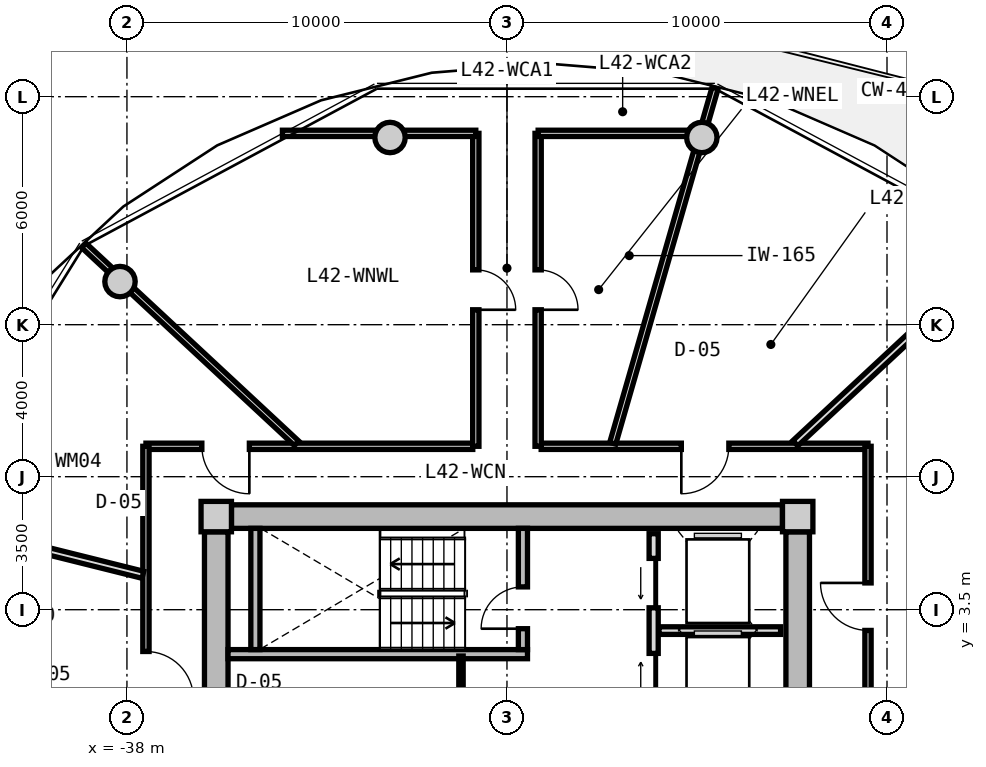
"""IFC4 building model, lengths in metres.
Left out: names, types, materials, properties, quantities, classifications, styles, units other than length and angle.
Written with IfcOpenShell. Run it as: python <this file> out.ifc"""

import sys

from ifc_helpers import new_model, si_unit, direction, frame, frame_2d, origin, origin_2d, place, context, subcontext, project, spatial, rectangle, circle, extrude, source, transform, mapped, element, fill, save


model = new_model("IFC4")
c1 = context("Model", 3, precision=1e-05, world=origin(), true_north=direction((0.0, 1.0)))
c2 = subcontext(c1, "Body", "Model", "MODEL_VIEW")
j1 = project(units=[si_unit("LENGTHUNIT", "METRE"), si_unit("PLANEANGLEUNIT", "RADIAN")], contexts=[c1])
p1 = place(None, origin())
s1 = spatial("IfcSite", under=j1, at=p1, CompositionType="ELEMENT")
p2 = place(p1, origin())
s2 = spatial("IfcBuilding", under=s1, at=p2, CompositionType="ELEMENT")
p3 = place(p2, frame((0.0, 0.0, 137.35)))
s3 = spatial("IfcBuildingStorey", under=s2, at=p3, CompositionType="ELEMENT", Elevation=137.35)
m1 = source(origin(), c2, "Body", "SweptSolid", [
    extrude(rectangle(XDim=0.8, YDim=0.8, at=origin_2d()), origin(), (0.0, 0.0, 1.0), 3.05),
])
for number, where, z_axis, x_axis in (
    (1, (-20.35, 5.95, 0.0), (0.0, 0.0, 1.0), (1.0, 0.0, 0.0)),
    (2, (-35.65, 5.95, 0.0), (0.0, 0.0, 1.0), (1.0, 0.0, 0.0)),
):
    element("IfcColumn", number, at=place(p3, frame(where, z_axis=z_axis, x_axis=x_axis)), inside=s3, PredefinedType="COLUMN", context=c2, shape_type="MappedRepresentation", body=[
        mapped(m1, transform((0.0, 0.0, 0.0), x_axis=(1.0, 0.0, 0.0), y_axis=(0.0, 1.0, 0.0), z_axis=(0.0, 0.0, 1.0), scale=1.0)),
    ])
m2 = source(origin(), c2, "Body", "SweptSolid", [
    extrude(rectangle(XDim=14.5, YDim=0.62, at=frame_2d((7.25, 0.0))), origin(), (0.0, 0.0, 1.0), 2.81),
])
p4 = place(p3, frame((-35.25, 5.95, 0.0), z_axis=(0.0, 0.0, 1.0), x_axis=(1.0, 0.0, 0.0)))
e3 = element("IfcWall", 3, at=p4, inside=s3, PredefinedType="SHEAR", context=c2, shape_type="MappedRepresentation", body=[
    mapped(m2, transform((0.0, 0.0, 0.0), x_axis=(1.0, 0.0, 0.0), y_axis=(0.0, 1.0, 0.0), z_axis=(0.0, 0.0, 1.0), scale=1.0)),
])
m3 = source(origin(), c2, "Body", "SweptSolid", [
    extrude(rectangle(XDim=11.1, YDim=0.62, at=frame_2d((5.55, 0.0))), origin(), (0.0, 0.0, 1.0), 2.81),
])
p5 = place(p3, frame((-35.65, -5.55, 0.0), z_axis=(0.0, 0.0, 1.0), x_axis=(0.0, 1.0, 0.0)))
e4 = element("IfcWall", 4, at=p5, inside=s3, PredefinedType="SHEAR", context=c2, shape_type="MappedRepresentation", body=[
    mapped(m3, transform((0.0, 0.0, 0.0), x_axis=(1.0, 0.0, 0.0), y_axis=(0.0, 1.0, 0.0), z_axis=(0.0, 0.0, 1.0), scale=1.0)),
])
p6 = place(p5, frame((3.8, 0.0, 0.0)))
e5 = element("IfcOpeningElement", 5, at=p6, cuts=e4, PredefinedType="OPENING", context=c2, shape_type="SweptSolid", body=[
    extrude(rectangle(XDim=1.2, YDim=2.15, at=frame_2d((0.6, 1.075))), frame((0.0, 0.32, 0.0), z_axis=(0.0, -1.0, 0.0), x_axis=(1.0, 0.0, 0.0)), (0.0, 0.0, 1.0), 0.64),
])
p7 = place(p3, frame((-20.35, 5.55, 0.0), z_axis=(0.0, 0.0, 1.0), x_axis=(0.0, -1.0, 0.0)))
e6 = element("IfcWall", 6, at=p7, inside=s3, PredefinedType="SHEAR", context=c2, shape_type="MappedRepresentation", body=[
    mapped(m3, transform((0.0, 0.0, 0.0), x_axis=(1.0, 0.0, 0.0), y_axis=(0.0, 1.0, 0.0), z_axis=(0.0, 0.0, 1.0), scale=1.0)),
])
p8 = place(p7, frame((5.65, 0.0, 0.0)))
e7 = element("IfcOpeningElement", 7, at=p8, cuts=e6, PredefinedType="OPENING", context=c2, shape_type="SweptSolid", body=[
    extrude(rectangle(XDim=1.2, YDim=2.15, at=frame_2d((0.6, 1.075))), frame((0.0, 0.32, 0.0), z_axis=(0.0, -1.0, 0.0), x_axis=(1.0, 0.0, 0.0)), (0.0, 0.0, 1.0), 0.64),
])
m4 = source(origin(), c2, "Body", "SweptSolid", [
    extrude(circle(Radius=0.4, at=origin_2d()), origin(), (0.0, 0.0, 1.0), 3.05),
])
for number, where, z_axis, x_axis in (
    (8, (-22.873, 15.926, 0.0), (0.0, 0.0, 1.0), (1.0, 0.0, 0.0)),
    (9, (-31.077, 15.926, 0.0), (0.0, 0.0, 1.0), (1.0, 0.0, 0.0)),
    (10, (-38.183, 12.135, 0.0), (0.0, 0.0, 1.0), (1.0, 0.0, 0.0)),
):
    element("IfcColumn", number, at=place(p3, frame(where, z_axis=z_axis, x_axis=x_axis)), inside=s3, PredefinedType="COLUMN", context=c2, shape_type="MappedRepresentation", body=[
        mapped(m4, transform((0.0, 0.0, 0.0), x_axis=(1.0, 0.0, 0.0), y_axis=(0.0, 1.0, 0.0), z_axis=(0.0, 0.0, 1.0), scale=1.0)),
    ])
m5 = source(origin(), c2, "Body", "SweptSolid", [
    extrude(rectangle(XDim=7.88, YDim=0.24, at=frame_2d((3.94, 0.0))), origin(), (0.0, 0.0, 1.0), 2.81),
])
p9 = place(p3, frame((-35.34, 2.33, 0.0), z_axis=(0.0, 0.0, 1.0), x_axis=(1.0, 0.0, 0.0)))
e11 = element("IfcWall", 11, at=p9, inside=s3, PredefinedType="PARTITIONING", context=c2, shape_type="MappedRepresentation", body=[
    mapped(m5, transform((0.0, 0.0, 0.0), x_axis=(1.0, 0.0, 0.0), y_axis=(0.0, 1.0, 0.0), z_axis=(0.0, 0.0, 1.0), scale=1.0)),
])
m6 = source(origin(), c2, "Body", "SweptSolid", [
    extrude(rectangle(XDim=3.19, YDim=0.24, at=frame_2d((1.595, 0.0))), origin(), (0.0, 0.0, 1.0), 2.81),
])
p10 = place(p3, frame((-34.62, 2.45, 0.0), z_axis=(0.0, 0.0, 1.0), x_axis=(0.0, 1.0, 0.0)))
e12 = element("IfcWall", 12, at=p10, inside=s3, PredefinedType="PARTITIONING", context=c2, shape_type="MappedRepresentation", body=[
    mapped(m6, transform((0.0, 0.0, 0.0), x_axis=(1.0, 0.0, 0.0), y_axis=(0.0, 1.0, 0.0), z_axis=(0.0, 0.0, 1.0), scale=1.0)),
])
p11 = place(p3, frame((-27.58, 2.45, 0.0), z_axis=(0.0, 0.0, 1.0), x_axis=(0.0, 1.0, 0.0)))
e13 = element("IfcWall", 13, at=p11, inside=s3, PredefinedType="PARTITIONING", context=c2, shape_type="MappedRepresentation", body=[
    mapped(m6, transform((0.0, 0.0, 0.0), x_axis=(1.0, 0.0, 0.0), y_axis=(0.0, 1.0, 0.0), z_axis=(0.0, 0.0, 1.0), scale=1.0)),
])
p12 = place(p11, frame((0.55, 0.0, 0.0)))
e14 = element("IfcOpeningElement", 14, at=p12, cuts=e13, PredefinedType="OPENING", context=c2, shape_type="SweptSolid", body=[
    extrude(rectangle(XDim=1.1, YDim=2.15, at=frame_2d((0.55, 1.075))), frame((0.0, 0.13, 0.0), z_axis=(0.0, -1.0, 0.0), x_axis=(1.0, 0.0, 0.0)), (0.0, 0.0, 1.0), 0.26),
])
m7 = source(origin(), c2, "Body", "SweptSolid", [
    extrude(rectangle(XDim=5.0, YDim=0.24, at=frame_2d((2.5, 0.0))), origin(), (0.0, 0.0, 1.0), 2.795),
])
p13 = place(p3, frame((-24.14, 0.5, 0.0), z_axis=(0.0, 0.0, 1.0), x_axis=(0.0, 1.0, 0.0)))
e15 = element("IfcWall", 15, at=p13, inside=s3, PredefinedType="PARTITIONING", context=c2, shape_type="MappedRepresentation", body=[
    mapped(m7, transform((0.0, 0.0, 0.0), x_axis=(1.0, 0.0, 0.0), y_axis=(0.0, 1.0, 0.0), z_axis=(0.0, 0.0, 1.0), scale=1.0)),
])
p14 = place(p13, frame((3.05, 0.0, 0.0)))
e16 = element("IfcOpeningElement", 16, at=p14, cuts=e15, PredefinedType="OPENING", context=c2, shape_type="SweptSolid", body=[
    extrude(rectangle(XDim=1.3, YDim=2.2, at=frame_2d((0.65, 1.1))), frame((0.0, 0.13, 0.0), z_axis=(0.0, -1.0, 0.0), x_axis=(1.0, 0.0, 0.0)), (0.0, 0.0, 1.0), 0.26),
])
p15 = place(p13, frame((0.55, 0.0, 0.0)))
e17 = element("IfcOpeningElement", 17, at=p15, cuts=e15, PredefinedType="OPENING", context=c2, shape_type="SweptSolid", body=[
    extrude(rectangle(XDim=1.3, YDim=2.2, at=frame_2d((0.65, 1.1))), frame((0.0, 0.13, 0.0), z_axis=(0.0, -1.0, 0.0), x_axis=(1.0, 0.0, 0.0)), (0.0, 0.0, 1.0), 0.26),
])
m8 = source(origin(), c2, "Body", "SweptSolid", [
    extrude(rectangle(XDim=3.2, YDim=0.2, at=frame_2d((1.6, 0.0))), origin(), (0.0, 0.0, 1.0), 2.795),
])
p16 = place(p3, frame((-24.0, 2.95, 0.0), z_axis=(0.0, 0.0, 1.0), x_axis=(1.0, 0.0, 0.0)))
e18 = element("IfcWall", 18, at=p16, inside=s3, PredefinedType="PARTITIONING", context=c2, shape_type="MappedRepresentation", body=[
    mapped(m8, transform((0.0, 0.0, 0.0), x_axis=(1.0, 0.0, 0.0), y_axis=(0.0, 1.0, 0.0), z_axis=(0.0, 0.0, 1.0), scale=1.0)),
])
m9 = source(origin(), c2, "Body", "SweptSolid", [
    extrude(rectangle(XDim=2.33, YDim=0.115, at=frame_2d((1.165, 0.0))), origin(), (0.0, 0.0, 1.0), 2.795),
])
p17 = place(p3, frame((-29.21, -0.05, 0.0), z_axis=(0.0, 0.0, 1.0), x_axis=(0.0, 1.0, 0.0)))
e19 = element("IfcWall", 19, at=p17, inside=s3, PredefinedType="PARTITIONING", context=c2, shape_type="MappedRepresentation", body=[
    mapped(m9, transform((0.0, 0.0, 0.0), x_axis=(1.0, 0.0, 0.0), y_axis=(0.0, 1.0, 0.0), z_axis=(0.0, 0.0, 1.0), scale=1.0)),
])
m10 = source(origin(), c2, "Body", "SweptSolid", [
    extrude(rectangle(XDim=8.6, YDim=0.165, at=frame_2d((4.3, 0.0))), origin(), (0.0, 0.0, 1.0), 2.795),
])
p18 = place(p3, frame((-37.5, 7.8, 0.0), z_axis=(0.0, 0.0, 1.0), x_axis=(1.0, 0.0, 0.0)))
e20 = element("IfcWall", 20, at=p18, inside=s3, PredefinedType="PARTITIONING", context=c2, shape_type="MappedRepresentation", body=[
    mapped(m10, transform((0.0, 0.0, 0.0), x_axis=(1.0, 0.0, 0.0), y_axis=(0.0, 1.0, 0.0), z_axis=(0.0, 0.0, 1.0), scale=1.0)),
])
p19 = place(p18, frame((1.471, 0.0, 0.0)))
e21 = element("IfcOpeningElement", 21, at=p19, cuts=e20, PredefinedType="OPENING", context=c2, shape_type="SweptSolid", body=[
    extrude(rectangle(XDim=1.25, YDim=2.2, at=frame_2d((0.625, 1.1))), frame((0.0, 0.093, 0.0), z_axis=(0.0, -1.0, 0.0), x_axis=(1.0, 0.0, 0.0)), (0.0, 0.0, 1.0), 0.185),
])
p20 = place(p3, frame((-27.1, 7.8, 0.0), z_axis=(0.0, 0.0, 1.0), x_axis=(1.0, 0.0, 0.0)))
e22 = element("IfcWall", 22, at=p20, inside=s3, PredefinedType="PARTITIONING", context=c2, shape_type="MappedRepresentation", body=[
    mapped(m10, transform((0.0, 0.0, 0.0), x_axis=(1.0, 0.0, 0.0), y_axis=(0.0, 1.0, 0.0), z_axis=(0.0, 0.0, 1.0), scale=1.0)),
])
p21 = place(p20, frame((3.688, 0.0, 0.0)))
e23 = element("IfcOpeningElement", 23, at=p21, cuts=e22, PredefinedType="OPENING", context=c2, shape_type="SweptSolid", body=[
    extrude(rectangle(XDim=1.25, YDim=2.2, at=frame_2d((0.625, 1.1))), frame((0.0, 0.093, 0.0), z_axis=(0.0, -1.0, 0.0), x_axis=(1.0, 0.0, 0.0)), (0.0, 0.0, 1.0), 0.185),
])
m11 = source(origin(), c2, "Body", "SweptSolid", [
    extrude(rectangle(XDim=15.6, YDim=0.165, at=frame_2d((7.8, 0.0))), origin(), (0.0, 0.0, 1.0), 2.795),
])
p22 = place(p3, frame((-37.5, -7.8, 0.0), z_axis=(0.0, 0.0, 1.0), x_axis=(0.0, 1.0, 0.0)))
e24 = element("IfcWall", 24, at=p22, inside=s3, PredefinedType="PARTITIONING", context=c2, shape_type="MappedRepresentation", body=[
    mapped(m11, transform((0.0, 0.0, 0.0), x_axis=(1.0, 0.0, 0.0), y_axis=(0.0, 1.0, 0.0), z_axis=(0.0, 0.0, 1.0), scale=1.0)),
])
p23 = place(p22, frame((8.95, 0.0, 0.0)))
e25 = element("IfcOpeningElement", 25, at=p23, cuts=e24, PredefinedType="OPENING", context=c2, shape_type="SweptSolid", body=[
    extrude(rectangle(XDim=1.25, YDim=2.2, at=frame_2d((0.625, 1.1))), frame((0.0, 0.093, 0.0), z_axis=(0.0, -1.0, 0.0), x_axis=(1.0, 0.0, 0.0)), (0.0, 0.0, 1.0), 0.185),
])
p24 = place(p22, frame((4.851, 0.0, 0.0)))
e26 = element("IfcOpeningElement", 26, at=p24, cuts=e24, PredefinedType="OPENING", context=c2, shape_type="SweptSolid", body=[
    extrude(rectangle(XDim=1.05, YDim=2.15, at=frame_2d((0.525, 1.075))), frame((0.0, 0.093, 0.0), z_axis=(0.0, -1.0, 0.0), x_axis=(1.0, 0.0, 0.0)), (0.0, 0.0, 1.0), 0.185),
])
p25 = place(p22, frame((1.488, 0.0, 0.0)))
e27 = element("IfcOpeningElement", 27, at=p25, cuts=e24, PredefinedType="OPENING", context=c2, shape_type="SweptSolid", body=[
    extrude(rectangle(XDim=1.05, YDim=2.15, at=frame_2d((0.525, 1.075))), frame((0.0, 0.093, 0.0), z_axis=(0.0, -1.0, 0.0), x_axis=(1.0, 0.0, 0.0)), (0.0, 0.0, 1.0), 0.185),
])
p26 = place(p3, frame((-18.5, 7.8, 0.0), z_axis=(0.0, 0.0, 1.0), x_axis=(0.0, -1.0, 0.0)))
e28 = element("IfcWall", 28, at=p26, inside=s3, PredefinedType="PARTITIONING", context=c2, shape_type="MappedRepresentation", body=[
    mapped(m11, transform((0.0, 0.0, 0.0), x_axis=(1.0, 0.0, 0.0), y_axis=(0.0, 1.0, 0.0), z_axis=(0.0, 0.0, 1.0), scale=1.0)),
])
p27 = place(p26, frame((10.881, 0.0, 0.0)))
e29 = element("IfcOpeningElement", 29, at=p27, cuts=e28, PredefinedType="OPENING", context=c2, shape_type="SweptSolid", body=[
    extrude(rectangle(XDim=1.05, YDim=2.15, at=frame_2d((0.525, 1.075))), frame((0.0, 0.093, 0.0), z_axis=(0.0, -1.0, 0.0), x_axis=(1.0, 0.0, 0.0)), (0.0, 0.0, 1.0), 0.185),
])
p28 = place(p26, frame((8.844, 0.0, 0.0)))
e30 = element("IfcOpeningElement", 30, at=p28, cuts=e28, PredefinedType="OPENING", context=c2, shape_type="SweptSolid", body=[
    extrude(rectangle(XDim=1.05, YDim=2.15, at=frame_2d((0.525, 1.075))), frame((0.0, 0.093, 0.0), z_axis=(0.0, -1.0, 0.0), x_axis=(1.0, 0.0, 0.0)), (0.0, 0.0, 1.0), 0.185),
])
p29 = place(p26, frame((3.596, 0.0, 0.0)))
e31 = element("IfcOpeningElement", 31, at=p29, cuts=e28, PredefinedType="OPENING", context=c2, shape_type="SweptSolid", body=[
    extrude(rectangle(XDim=1.25, YDim=2.2, at=frame_2d((0.625, 1.1))), frame((0.0, 0.093, 0.0), z_axis=(0.0, -1.0, 0.0), x_axis=(1.0, 0.0, 0.0)), (0.0, 0.0, 1.0), 0.185),
])
m12 = source(origin(), c2, "Body", "SweptSolid", [
    extrude(rectangle(XDim=9.73, YDim=0.165, at=frame_2d((4.865, 0.0))), origin(), (0.0, 0.0, 1.0), 2.345),
])
p30 = place(p3, frame((-25.217, 7.88, 0.0), z_axis=(0.0, 0.0, 1.0), x_axis=(0.27679492614, 0.960929013436, 0.0)))
e32 = element("IfcWall", 32, at=p30, inside=s3, PredefinedType="PARTITIONING", context=c2, shape_type="MappedRepresentation", body=[
    mapped(m12, transform((0.0, 0.0, 0.0), x_axis=(1.0, 0.0, 0.0), y_axis=(0.0, 1.0, 0.0), z_axis=(0.0, 0.0, 1.0), scale=1.0)),
])
m13 = source(origin(), c2, "Body", "SweptSolid", [
    extrude(rectangle(XDim=7.648, YDim=0.165, at=frame_2d((3.824, 0.0))), origin(), (0.0, 0.0, 1.0), 2.345),
])
p31 = place(p3, frame((-33.538, 7.88, 0.0), z_axis=(0.0, 0.0, 1.0), x_axis=(-0.732167856666, 0.681124239522, 0.0)))
e33 = element("IfcWall", 33, at=p31, inside=s3, PredefinedType="PARTITIONING", context=c2, shape_type="MappedRepresentation", body=[
    mapped(m13, transform((0.0, 0.0, 0.0), x_axis=(1.0, 0.0, 0.0), y_axis=(0.0, 1.0, 0.0), z_axis=(0.0, 0.0, 1.0), scale=1.0)),
])
m14 = source(origin(), c2, "Body", "SweptSolid", [
    extrude(rectangle(XDim=8.235, YDim=0.165, at=frame_2d((4.118, 0.0))), origin(), (0.0, 0.0, 1.0), 2.795),
])
p32 = place(p3, frame((-28.82, 7.8, 0.0), z_axis=(0.0, 0.0, 1.0), x_axis=(0.0, 1.0, 0.0)))
e34 = element("IfcWall", 34, at=p32, inside=s3, PredefinedType="PARTITIONING", context=c2, shape_type="MappedRepresentation", body=[
    mapped(m14, transform((0.0, 0.0, 0.0), x_axis=(1.0, 0.0, 0.0), y_axis=(0.0, 1.0, 0.0), z_axis=(0.0, 0.0, 1.0), scale=1.0)),
])
p33 = place(p32, frame((3.593, 0.0, 0.0)))
e35 = element("IfcOpeningElement", 35, at=p33, cuts=e34, PredefinedType="OPENING", context=c2, shape_type="SweptSolid", body=[
    extrude(rectangle(XDim=1.05, YDim=2.15, at=frame_2d((0.525, 1.075))), frame((0.0, 0.093, 0.0), z_axis=(0.0, -1.0, 0.0), x_axis=(1.0, 0.0, 0.0)), (0.0, 0.0, 1.0), 0.185),
])
m15 = source(origin(), c2, "Body", "SweptSolid", [
    extrude(rectangle(XDim=5.089, YDim=0.165, at=frame_2d((2.544, 0.0))), origin(), (0.0, 0.0, 1.0), 2.345),
])
p34 = place(p3, frame((-33.909, 16.035, 0.0), z_axis=(0.0, 0.0, 1.0), x_axis=(1.0, 0.0, 0.0)))
e36 = element("IfcWall", 36, at=p34, inside=s3, PredefinedType="PARTITIONING", context=c2, shape_type="MappedRepresentation", body=[
    mapped(m15, transform((0.0, 0.0, 0.0), x_axis=(1.0, 0.0, 0.0), y_axis=(0.0, 1.0, 0.0), z_axis=(0.0, 0.0, 1.0), scale=1.0)),
])
p35 = place(p3, frame((-27.18, 7.8, 0.0), z_axis=(0.0, 0.0, 1.0), x_axis=(0.0, 1.0, 0.0)))
e37 = element("IfcWall", 37, at=p35, inside=s3, PredefinedType="PARTITIONING", context=c2, shape_type="MappedRepresentation", body=[
    mapped(m14, transform((0.0, 0.0, 0.0), x_axis=(1.0, 0.0, 0.0), y_axis=(0.0, 1.0, 0.0), z_axis=(0.0, 0.0, 1.0), scale=1.0)),
])
p36 = place(p35, frame((3.593, 0.0, 0.0)))
e38 = element("IfcOpeningElement", 38, at=p36, cuts=e37, PredefinedType="OPENING", context=c2, shape_type="SweptSolid", body=[
    extrude(rectangle(XDim=1.05, YDim=2.15, at=frame_2d((0.525, 1.075))), frame((0.0, 0.093, 0.0), z_axis=(0.0, -1.0, 0.0), x_axis=(1.0, 0.0, 0.0)), (0.0, 0.0, 1.0), 0.185),
])
m16 = source(origin(), c2, "Body", "SweptSolid", [
    extrude(rectangle(XDim=4.469, YDim=0.165, at=frame_2d((2.234, 0.0))), origin(), (0.0, 0.0, 1.0), 2.345),
])
p37 = place(p3, frame((-27.18, 16.035, 0.0), z_axis=(0.0, 0.0, 1.0), x_axis=(1.0, 0.0, 0.0)))
e39 = element("IfcWall", 39, at=p37, inside=s3, PredefinedType="PARTITIONING", context=c2, shape_type="MappedRepresentation", body=[
    mapped(m16, transform((0.0, 0.0, 0.0), x_axis=(1.0, 0.0, 0.0), y_axis=(0.0, 1.0, 0.0), z_axis=(0.0, 0.0, 1.0), scale=1.0)),
])
m17 = source(origin(), c2, "Body", "SweptSolid", [
    extrude(rectangle(XDim=6.193, YDim=0.19, at=frame_2d((3.096, 0.0))), origin(), (0.0, 0.0, 1.0), 2.345),
])
p38 = place(p3, frame((-37.58, 4.419, 0.0), z_axis=(0.0, 0.0, 1.0), x_axis=(-0.970309243466, 0.241867674657, 0.0)))
e40 = element("IfcWall", 40, at=p38, inside=s3, PredefinedType="PARTITIONING", context=c2, shape_type="MappedRepresentation", body=[
    mapped(m17, transform((0.0, 0.0, 0.0), x_axis=(1.0, 0.0, 0.0), y_axis=(0.0, 1.0, 0.0), z_axis=(0.0, 0.0, 1.0), scale=1.0)),
])
m18 = source(origin(), c2, "Body", "SweptSolid", [
    extrude(rectangle(XDim=7.648, YDim=0.19, at=frame_2d((3.824, 0.0))), origin(), (0.0, 0.0, 1.0), 2.345),
])
p39 = place(p3, frame((-20.413, 7.88, 0.0), z_axis=(0.0, 0.0, 1.0), x_axis=(0.732182665826, 0.681108320213, 0.0)))
e41 = element("IfcWall", 41, at=p39, inside=s3, PredefinedType="PARTITIONING", context=c2, shape_type="MappedRepresentation", body=[
    mapped(m18, transform((0.0, 0.0, 0.0), x_axis=(1.0, 0.0, 0.0), y_axis=(0.0, 1.0, 0.0), z_axis=(0.0, 0.0, 1.0), scale=1.0)),
])
m19 = source(origin(), c2, "Body", "SweptSolid", [
    extrude(rectangle(XDim=1.1, YDim=2.15, at=frame_2d((0.55, 1.075))), frame((0.0, 0.025, 0.0), z_axis=(0.0, -1.0, 0.0), x_axis=(1.0, 0.0, 0.0)), (0.0, 0.0, 1.0), 0.05),
])
p40 = place(p12, origin())
e42 = element("IfcDoor", 42, at=p40, inside=s3, OperationType="SINGLE_SWING_LEFT", PredefinedType="DOOR", context=c2, shape_type="MappedRepresentation", body=[
    mapped(m19, transform((0.0, 0.0, 0.0), x_axis=(1.0, 0.0, 0.0), y_axis=(0.0, 1.0, 0.0), z_axis=(0.0, 0.0, 1.0), scale=1.0)),
])
fill(e14, e42)
m20 = source(origin(), c2, "Body", "SweptSolid", [
    extrude(rectangle(XDim=1.3, YDim=2.2, at=frame_2d((0.65, 1.1))), frame((0.0, 0.025, 0.0), z_axis=(0.0, -1.0, 0.0), x_axis=(1.0, 0.0, 0.0)), (0.0, 0.0, 1.0), 0.05),
])
p41 = place(p14, origin())
e43 = element("IfcDoor", 43, at=p41, inside=s3, OperationType="SLIDING_TO_LEFT", PredefinedType="DOOR", context=c2, shape_type="MappedRepresentation", body=[
    mapped(m20, transform((0.0, 0.0, 0.0), x_axis=(1.0, 0.0, 0.0), y_axis=(0.0, 1.0, 0.0), z_axis=(0.0, 0.0, 1.0), scale=1.0)),
])
fill(e16, e43)
p42 = place(p15, origin())
e44 = element("IfcDoor", 44, at=p42, inside=s3, OperationType="SLIDING_TO_RIGHT", PredefinedType="DOOR", context=c2, shape_type="MappedRepresentation", body=[
    mapped(m20, transform((0.0, 0.0, 0.0), x_axis=(1.0, 0.0, 0.0), y_axis=(0.0, 1.0, 0.0), z_axis=(0.0, 0.0, 1.0), scale=1.0)),
])
fill(e17, e44)
m21 = source(origin(), c2, "Body", "SweptSolid", [
    extrude(rectangle(XDim=1.05, YDim=2.15, at=frame_2d((0.525, 1.075))), frame((0.0, 0.025, 0.0), z_axis=(0.0, -1.0, 0.0), x_axis=(1.0, 0.0, 0.0)), (0.0, 0.0, 1.0), 0.05),
])
p43 = place(p33, frame((1.05, 0.0, 0.0), z_axis=(0.0, 0.0, 1.0), x_axis=(-1.0, 0.0, 0.0)))
e45 = element("IfcDoor", 45, at=p43, inside=s3, OperationType="SINGLE_SWING_RIGHT", PredefinedType="DOOR", context=c2, shape_type="MappedRepresentation", body=[
    mapped(m21, transform((0.0, 0.0, 0.0), x_axis=(1.0, 0.0, 0.0), y_axis=(0.0, 1.0, 0.0), z_axis=(0.0, 0.0, 1.0), scale=1.0)),
])
fill(e35, e45)
p44 = place(p36, frame((1.05, 0.0, 0.0), z_axis=(0.0, 0.0, 1.0), x_axis=(-1.0, 0.0, 0.0)))
e46 = element("IfcDoor", 46, at=p44, inside=s3, OperationType="SINGLE_SWING_RIGHT", PredefinedType="DOOR", context=c2, shape_type="MappedRepresentation", body=[
    mapped(m21, transform((0.0, 0.0, 0.0), x_axis=(1.0, 0.0, 0.0), y_axis=(0.0, 1.0, 0.0), z_axis=(0.0, 0.0, 1.0), scale=1.0)),
])
fill(e38, e46)
m22 = source(origin(), c2, "Body", "SweptSolid", [
    extrude(rectangle(XDim=1.25, YDim=2.2, at=frame_2d((0.625, 1.1))), frame((0.0, 0.025, 0.0), z_axis=(0.0, -1.0, 0.0), x_axis=(1.0, 0.0, 0.0)), (0.0, 0.0, 1.0), 0.05),
])
p45 = place(p19, frame((1.25, 0.0, 0.0), z_axis=(0.0, 0.0, 1.0), x_axis=(-1.0, 0.0, 0.0)))
e47 = element("IfcDoor", 47, at=p45, inside=s3, OperationType="SINGLE_SWING_LEFT", PredefinedType="DOOR", context=c2, shape_type="MappedRepresentation", body=[
    mapped(m22, transform((0.0, 0.0, 0.0), x_axis=(1.0, 0.0, 0.0), y_axis=(0.0, 1.0, 0.0), z_axis=(0.0, 0.0, 1.0), scale=1.0)),
])
fill(e21, e47)
p46 = place(p23, frame((1.25, 0.0, 0.0), z_axis=(0.0, 0.0, 1.0), x_axis=(-1.0, 0.0, 0.0)))
e48 = element("IfcDoor", 48, at=p46, inside=s3, OperationType="SINGLE_SWING_RIGHT", PredefinedType="DOOR", context=c2, shape_type="MappedRepresentation", body=[
    mapped(m22, transform((0.0, 0.0, 0.0), x_axis=(1.0, 0.0, 0.0), y_axis=(0.0, 1.0, 0.0), z_axis=(0.0, 0.0, 1.0), scale=1.0)),
])
fill(e25, e48)
p47 = place(p29, frame((1.25, 0.0, 0.0), z_axis=(0.0, 0.0, 1.0), x_axis=(-1.0, 0.0, 0.0)))
e49 = element("IfcDoor", 49, at=p47, inside=s3, OperationType="SINGLE_SWING_RIGHT", PredefinedType="DOOR", context=c2, shape_type="MappedRepresentation", body=[
    mapped(m22, transform((0.0, 0.0, 0.0), x_axis=(1.0, 0.0, 0.0), y_axis=(0.0, 1.0, 0.0), z_axis=(0.0, 0.0, 1.0), scale=1.0)),
])
fill(e31, e49)
p48 = place(p21, frame((1.25, 0.0, 0.0), z_axis=(0.0, 0.0, 1.0), x_axis=(-1.0, 0.0, 0.0)))
e50 = element("IfcDoor", 50, at=p48, inside=s3, OperationType="SINGLE_SWING_RIGHT", PredefinedType="DOOR", context=c2, shape_type="MappedRepresentation", body=[
    mapped(m22, transform((0.0, 0.0, 0.0), x_axis=(1.0, 0.0, 0.0), y_axis=(0.0, 1.0, 0.0), z_axis=(0.0, 0.0, 1.0), scale=1.0)),
])
fill(e23, e50)
save(model, sys.argv[1])
